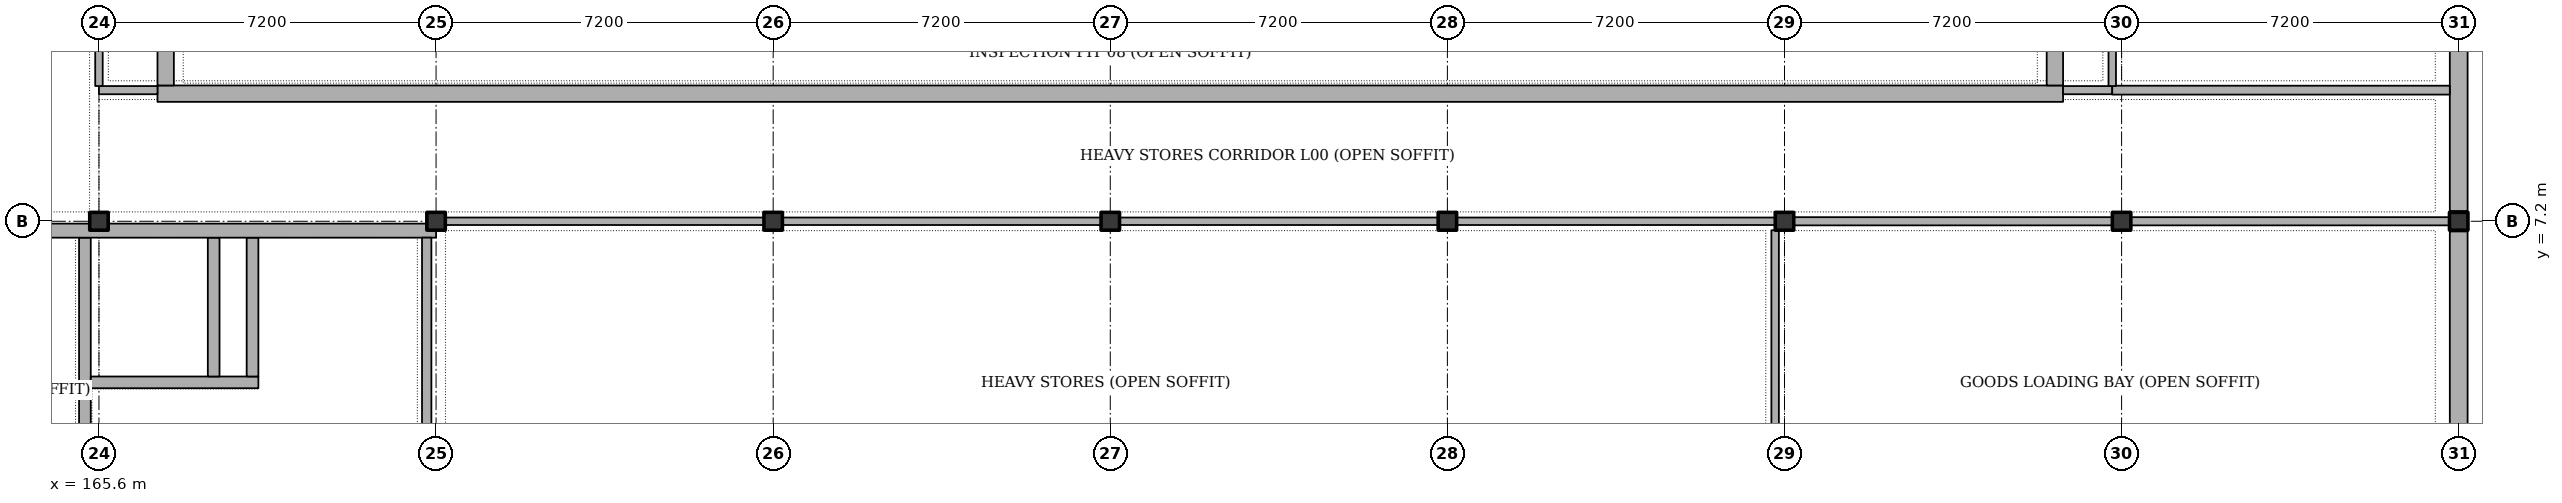
"""IFC4 building model, lengths in metres.
Left out: names, types, materials, properties, quantities, classifications, styles, units other than length and angle.
Written with IfcOpenShell. Run it as: python <this file> out.ifc"""

import sys

from ifc_helpers import new_model, si_unit, direction, frame, frame_2d, origin, origin_2d, place, context, subcontext, project, spatial, rectangle, i_section, extrude, element, fill, save


model = new_model("IFC4")
c1 = context("Model", 3, precision=1e-05, world=origin(), true_north=direction((0.0, 1.0)))
c2 = subcontext(c1, "Body", "Model", "MODEL_VIEW")
j1 = project(units=[si_unit("LENGTHUNIT", "METRE"), si_unit("PLANEANGLEUNIT", "RADIAN")], contexts=[c1])
p1 = place(None, origin())
s1 = spatial("IfcSite", under=j1, at=p1, CompositionType="ELEMENT")
p2 = place(p1, origin())
s2 = spatial("IfcBuilding", under=s1, at=p2, CompositionType="ELEMENT")
p3 = place(p2, origin())
s3 = spatial("IfcBuildingStorey", under=s2, at=p3, CompositionType="ELEMENT", Elevation=0.0)
p4 = place(p3, frame((166.85, 9.925, -1.55), z_axis=(0.0, 0.0, 1.0), x_axis=(1.0, 0.0, 0.0)))
e1 = element("IfcWall", 1, at=p4, inside=s3, PredefinedType="USERDEFINED", context=c2, shape_type="SweptSolid", body=[
    extrude(rectangle(XDim=40.7, YDim=0.35, at=frame_2d((20.35, 0.0))), origin(), (0.0, 0.0, 1.0), 1.55),
])
for number, where, z_axis, x_axis in (
    (2, (167.025, 10.1, -1.55), (0.0, 0.0, 1.0), (0.0, 1.0, 0.0)),
    (3, (207.375, 10.1, -1.55), (0.0, 0.0, 1.0), (0.0, 1.0, 0.0)),
):
    element("IfcWall", number, at=place(p3, frame(where, z_axis=z_axis, x_axis=x_axis)), inside=s3, PredefinedType="USERDEFINED", context=c2, shape_type="SweptSolid", body=[
        extrude(rectangle(XDim=1.4, YDim=0.35, at=frame_2d((0.7, 0.0))), origin(), (0.0, 0.0, 1.0), 1.55),
    ])
for number, where, z_axis, x_axis in (
    (4, (165.6, 7.2, -0.3), (0.0, 0.0, 1.0), (1.0, 0.0, 0.0)),
    (5, (172.8, 7.2, -0.3), (0.0, 0.0, 1.0), (1.0, 0.0, 0.0)),
    (6, (180.0, 7.2, -0.3), (0.0, 0.0, 1.0), (1.0, 0.0, 0.0)),
    (7, (187.2, 7.2, -0.3), (0.0, 0.0, 1.0), (1.0, 0.0, 0.0)),
    (8, (194.4, 7.2, -0.3), (0.0, 0.0, 1.0), (1.0, 0.0, 0.0)),
    (9, (201.6, 7.2, -0.3), (0.0, 0.0, 1.0), (1.0, 0.0, 0.0)),
    (10, (208.8, 7.2, -0.3), (0.0, 0.0, 1.0), (1.0, 0.0, 0.0)),
    (11, (216.0, 7.2, -0.3), (0.0, 0.0, 1.0), (1.0, 0.0, 0.0)),
):
    element("IfcColumn", number, at=place(p3, frame(where, z_axis=z_axis, x_axis=x_axis)), inside=s3, PredefinedType="COLUMN", context=c2, shape_type="SweptSolid", body=[
        extrude(i_section(OverallWidth=0.395, OverallDepth=0.381, WebThickness=0.018, FlangeThickness=0.03, FilletRadius=0.015, at=origin_2d()), origin(), (0.0, 0.0, 1.0), 5.7),
    ])
p5 = place(p3, frame((216.0, 14.183, 0.0), z_axis=(0.0, 0.0, 1.0), x_axis=(0.0, -1.0, 0.0)))
e12 = element("IfcWall", 12, at=p5, inside=s3, PredefinedType="SOLIDWALL", context=c2, shape_type="SweptSolid", body=[
    extrude(rectangle(XDim=6.765, YDim=0.38, at=frame_2d((3.383, 0.0))), origin(), (0.0, 0.0, 1.0), 4.413),
])
p6 = place(p5, frame((1.066, 0.0, 1.05)))
e13 = element("IfcOpeningElement", 13, at=p6, cuts=e12, PredefinedType="OPENING", context=c2, shape_type="SweptSolid", body=[
    extrude(rectangle(XDim=2.2, YDim=1.35, at=frame_2d((1.1, 0.675))), frame((0.0, 0.2, 0.0), z_axis=(0.0, -1.0, 0.0), x_axis=(1.0, 0.0, 0.0)), (0.0, 0.0, 1.0), 0.4),
])
p7 = place(p3, frame((216.0, 6.983, 0.0), z_axis=(0.0, 0.0, 1.0), x_axis=(0.0, -1.0, 0.0)))
e14 = element("IfcWall", 14, at=p7, inside=s3, PredefinedType="SOLIDWALL", context=c2, shape_type="SweptSolid", body=[
    extrude(rectangle(XDim=6.765, YDim=0.38, at=frame_2d((3.383, 0.0))), origin(), (0.0, 0.0, 1.0), 4.413),
])
p8 = place(p7, frame((2.058, 0.0, 1.05)))
e15 = element("IfcOpeningElement", 15, at=p8, cuts=e14, PredefinedType="OPENING", context=c2, shape_type="SweptSolid", body=[
    extrude(rectangle(XDim=2.65, YDim=1.6, at=frame_2d((1.325, 0.8))), frame((0.0, 0.2, 0.0), z_axis=(0.0, -1.0, 0.0), x_axis=(1.0, 0.0, 0.0)), (0.0, 0.0, 1.0), 0.4),
])
p9 = place(p3, frame((165.3, 0.18, 0.0), z_axis=(0.0, 0.0, 1.0), x_axis=(0.0, 1.0, 0.0)))
e16 = element("IfcWall", 16, at=p9, inside=s3, PredefinedType="SHEAR", context=c2, shape_type="SweptSolid", body=[
    extrude(rectangle(XDim=6.67, YDim=0.25, at=frame_2d((3.335, 0.0))), origin(), (0.0, 0.0, 1.0), 4.45),
])
p10 = place(p9, frame((1.12, 0.0, 0.0)))
e17 = element("IfcOpeningElement", 17, at=p10, cuts=e16, PredefinedType="OPENING", context=c2, shape_type="SweptSolid", body=[
    extrude(rectangle(XDim=1.35, YDim=2.15, at=frame_2d((0.675, 1.075))), frame((0.0, 0.135, 0.0), z_axis=(0.0, -1.0, 0.0), x_axis=(1.0, 0.0, 0.0)), (0.0, 0.0, 1.0), 0.27),
])
p11 = place(p3, frame((165.425, 3.76, 0.0), z_axis=(0.0, 0.0, 1.0), x_axis=(1.0, 0.0, 0.0)))
e18 = element("IfcWall", 18, at=p11, inside=s3, PredefinedType="SHEAR", context=c2, shape_type="SweptSolid", body=[
    extrude(rectangle(XDim=3.58, YDim=0.25, at=frame_2d((1.79, 0.0))), origin(), (0.0, 0.0, 1.0), 4.45),
])
p12 = place(p11, frame((0.775, 0.0, 0.0)))
e19 = element("IfcOpeningElement", 19, at=p12, cuts=e18, PredefinedType="OPENING", context=c2, shape_type="SweptSolid", body=[
    extrude(rectangle(XDim=1.3, YDim=2.2, at=frame_2d((0.65, 1.1))), frame((0.0, 0.135, 0.0), z_axis=(0.0, -1.0, 0.0), x_axis=(1.0, 0.0, 0.0)), (0.0, 0.0, 1.0), 0.27),
])
p13 = place(p3, frame((168.05, 3.885, 0.0), z_axis=(0.0, 0.0, 1.0), x_axis=(0.0, 1.0, 0.0)))
e20 = element("IfcWall", 20, at=p13, inside=s3, PredefinedType="SHEAR", context=c2, shape_type="SweptSolid", body=[
    extrude(rectangle(XDim=2.965, YDim=0.25, at=frame_2d((1.482, 0.0))), origin(), (0.0, 0.0, 1.0), 4.45),
])
p14 = place(p3, frame((168.88, 3.885, 0.0), z_axis=(0.0, 0.0, 1.0), x_axis=(0.0, 1.0, 0.0)))
e21 = element("IfcWall", 21, at=p14, inside=s3, PredefinedType="SHEAR", context=c2, shape_type="SweptSolid", body=[
    extrude(rectangle(XDim=2.965, YDim=0.25, at=frame_2d((1.482, 0.0))), origin(), (0.0, 0.0, 1.0), 4.45),
])
p15 = place(p14, frame((0.9, 0.0, 0.0)))
e22 = element("IfcOpeningElement", 22, at=p15, cuts=e21, PredefinedType="OPENING", context=c2, shape_type="SweptSolid", body=[
    extrude(rectangle(XDim=0.92, YDim=2.05, at=frame_2d((0.46, 1.025))), frame((0.0, 0.135, 0.0), z_axis=(0.0, -1.0, 0.0), x_axis=(1.0, 0.0, 0.0)), (0.0, 0.0, 1.0), 0.27),
])
p16 = place(p3, frame((158.57, 7.0, 0.0), z_axis=(0.0, 0.0, 1.0), x_axis=(1.0, 0.0, 0.0)))
e23 = element("IfcWall", 23, at=p16, inside=s3, PredefinedType="SHEAR", context=c2, shape_type="SweptSolid", body=[
    extrude(rectangle(XDim=14.23, YDim=0.3, at=frame_2d((7.115, 0.0))), origin(), (0.0, 0.0, 1.0), 4.45),
])
p17 = place(p16, frame((11.38, 0.0, 0.0)))
e24 = element("IfcOpeningElement", 24, at=p17, cuts=e23, PredefinedType="OPENING", context=c2, shape_type="SweptSolid", body=[
    extrude(rectangle(XDim=1.5, YDim=2.15, at=frame_2d((0.75, 1.075))), frame((0.0, 0.16, 0.0), z_axis=(0.0, -1.0, 0.0), x_axis=(1.0, 0.0, 0.0)), (0.0, 0.0, 1.0), 0.32),
])
p18 = place(p3, frame((172.6, 0.18, 0.0), z_axis=(0.0, 0.0, 1.0), x_axis=(0.0, 1.0, 0.0)))
e25 = element("IfcWall", 25, at=p18, inside=s3, PredefinedType="SOLIDWALL", context=c2, shape_type="SweptSolid", body=[
    extrude(rectangle(XDim=6.67, YDim=0.2, at=frame_2d((3.335, 0.0))), origin(), (0.0, 0.0, 1.0), 4.245),
])
p19 = place(p3, frame((165.6, 10.0, 0.0), z_axis=(0.0, 0.0, 1.0), x_axis=(1.0, 0.0, 0.0)))
e26 = element("IfcWall", 26, at=p19, inside=s3, PredefinedType="PARTITIONING", context=c2, shape_type="SweptSolid", body=[
    extrude(rectangle(XDim=1.25, YDim=0.175, at=frame_2d((0.625, 0.0))), origin(), (0.0, 0.0, 1.0), 3.55),
])
p20 = place(p19, frame((0.25, 0.0, 0.0)))
e27 = element("IfcOpeningElement", 27, at=p20, cuts=e26, PredefinedType="OPENING", context=c2, shape_type="SweptSolid", body=[
    extrude(rectangle(XDim=0.88, YDim=2.05, at=frame_2d((0.44, 1.025))), frame((0.0, 0.097, 0.0), z_axis=(0.0, -1.0, 0.0), x_axis=(1.0, 0.0, 0.0)), (0.0, 0.0, 1.0), 0.195),
])
p21 = place(p3, frame((207.55, 10.0, 0.0), z_axis=(0.0, 0.0, 1.0), x_axis=(1.0, 0.0, 0.0)))
e28 = element("IfcWall", 28, at=p21, inside=s3, PredefinedType="PARTITIONING", context=c2, shape_type="SweptSolid", body=[
    extrude(rectangle(XDim=1.05, YDim=0.175, at=frame_2d((0.525, 0.0))), origin(), (0.0, 0.0, 1.0), 3.55),
])
p22 = place(p3, frame((208.6, 10.0, 0.0), z_axis=(0.0, 0.0, 1.0), x_axis=(1.0, 0.0, 0.0)))
e29 = element("IfcWall", 29, at=p22, inside=s3, PredefinedType="PARTITIONING", context=c2, shape_type="SweptSolid", body=[
    extrude(rectangle(XDim=7.21, YDim=0.19, at=frame_2d((3.605, 0.0))), origin(), (0.0, 0.0, 1.0), 3.55),
])
p23 = place(p22, frame((2.675, 0.0, 0.0)))
e30 = element("IfcOpeningElement", 30, at=p23, cuts=e29, PredefinedType="OPENING", context=c2, shape_type="SweptSolid", body=[
    extrude(rectangle(XDim=1.75, YDim=2.25, at=frame_2d((0.875, 1.125))), frame((0.0, 0.105, 0.0), z_axis=(0.0, -1.0, 0.0), x_axis=(1.0, 0.0, 0.0)), (0.0, 0.0, 1.0), 0.21),
])
p24 = place(p3, frame((172.999, 7.2, 0.0), z_axis=(0.0, 0.0, 1.0), x_axis=(1.0, 0.0, 0.0)))
e31 = element("IfcWall", 31, at=p24, inside=s3, PredefinedType="PARTITIONING", context=c2, shape_type="SweptSolid", body=[
    extrude(rectangle(XDim=6.802, YDim=0.16, at=frame_2d((3.401, 0.0))), origin(), (0.0, 0.0, 1.0), 3.55),
])
p25 = place(p3, frame((180.199, 7.2, 0.0), z_axis=(0.0, 0.0, 1.0), x_axis=(1.0, 0.0, 0.0)))
e32 = element("IfcWall", 32, at=p25, inside=s3, PredefinedType="PARTITIONING", context=c2, shape_type="SweptSolid", body=[
    extrude(rectangle(XDim=6.802, YDim=0.16, at=frame_2d((3.401, 0.0))), origin(), (0.0, 0.0, 1.0), 3.55),
])
p26 = place(p25, frame((2.861, 0.0, 0.0)))
e33 = element("IfcOpeningElement", 33, at=p26, cuts=e32, PredefinedType="OPENING", context=c2, shape_type="SweptSolid", body=[
    extrude(rectangle(XDim=1.08, YDim=2.15, at=frame_2d((0.54, 1.075))), frame((0.0, 0.09, 0.0), z_axis=(0.0, -1.0, 0.0), x_axis=(1.0, 0.0, 0.0)), (0.0, 0.0, 1.0), 0.18),
])
p27 = place(p3, frame((187.399, 7.2, 0.0), z_axis=(0.0, 0.0, 1.0), x_axis=(1.0, 0.0, 0.0)))
e34 = element("IfcWall", 34, at=p27, inside=s3, PredefinedType="PARTITIONING", context=c2, shape_type="SweptSolid", body=[
    extrude(rectangle(XDim=6.802, YDim=0.16, at=frame_2d((3.401, 0.0))), origin(), (0.0, 0.0, 1.0), 3.55),
])
p28 = place(p3, frame((194.599, 7.2, 0.0), z_axis=(0.0, 0.0, 1.0), x_axis=(1.0, 0.0, 0.0)))
e35 = element("IfcWall", 35, at=p28, inside=s3, PredefinedType="PARTITIONING", context=c2, shape_type="SweptSolid", body=[
    extrude(rectangle(XDim=6.801, YDim=0.16, at=frame_2d((3.4, 0.0))), origin(), (0.0, 0.0, 1.0), 3.55),
])
p29 = place(p3, frame((201.799, 7.2, 0.0), z_axis=(0.0, 0.0, 1.0), x_axis=(1.0, 0.0, 0.0)))
e36 = element("IfcWall", 36, at=p29, inside=s3, PredefinedType="PARTITIONING", context=c2, shape_type="SweptSolid", body=[
    extrude(rectangle(XDim=6.802, YDim=0.175, at=frame_2d((3.401, 0.0))), origin(), (0.0, 0.0, 1.0), 3.55),
])
p30 = place(p29, frame((2.841, 0.0, 0.0)))
e37 = element("IfcOpeningElement", 37, at=p30, cuts=e36, PredefinedType="OPENING", context=c2, shape_type="SweptSolid", body=[
    extrude(rectangle(XDim=1.12, YDim=2.18, at=frame_2d((0.56, 1.09))), frame((0.0, 0.097, 0.0), z_axis=(0.0, -1.0, 0.0), x_axis=(1.0, 0.0, 0.0)), (0.0, 0.0, 1.0), 0.195),
])
p31 = place(p3, frame((208.999, 7.2, 0.0), z_axis=(0.0, 0.0, 1.0), x_axis=(1.0, 0.0, 0.0)))
e38 = element("IfcWall", 38, at=p31, inside=s3, PredefinedType="PARTITIONING", context=c2, shape_type="SweptSolid", body=[
    extrude(rectangle(XDim=6.802, YDim=0.175, at=frame_2d((3.401, 0.0))), origin(), (0.0, 0.0, 1.0), 3.55),
])
for number, where, z_axis, x_axis in (
    (39, (165.6, 10.088, 0.0), (0.0, 0.0, 1.0), (0.0, 1.0, 0.0)),
    (40, (208.6, 10.088, 0.0), (0.0, 0.0, 1.0), (0.0, 1.0, 0.0)),
):
    element("IfcWall", number, at=place(p3, frame(where, z_axis=z_axis, x_axis=x_axis)), inside=s3, PredefinedType="PARTITIONING", context=c2, shape_type="SweptSolid", body=[
        extrude(rectangle(XDim=4.119, YDim=0.16, at=frame_2d((2.06, 0.0))), origin(), (0.0, 0.0, 1.0), 3.55),
    ])
p32 = place(p3, frame((201.4, 0.193, 0.0), z_axis=(0.0, 0.0, 1.0), x_axis=(0.0, 1.0, 0.0)))
e41 = element("IfcWall", 41, at=p32, inside=s3, PredefinedType="PARTITIONING", context=c2, shape_type="SweptSolid", body=[
    extrude(rectangle(XDim=6.815, YDim=0.16, at=frame_2d((3.407, 0.0))), origin(), (0.0, 0.0, 1.0), 3.55),
])
p33 = place(p8, origin())
e42 = element("IfcWindow", 42, at=p33, inside=s3, PartitioningType="SINGLE_PANEL", PredefinedType="WINDOW", context=c2, shape_type="SweptSolid", body=[
    extrude(rectangle(XDim=2.65, YDim=1.6, at=frame_2d((1.325, 0.8))), frame((0.0, 0.03, 0.0), z_axis=(0.0, -1.0, 0.0), x_axis=(1.0, 0.0, 0.0)), (0.0, 0.0, 1.0), 0.06),
])
fill(e15, e42)
p34 = place(p12, origin())
e43 = element("IfcDoor", 43, at=p34, inside=s3, OperationType="SLIDING_TO_LEFT", PredefinedType="DOOR", context=c2, shape_type="SweptSolid", body=[
    extrude(rectangle(XDim=1.3, YDim=2.2, at=frame_2d((0.65, 1.1))), frame((0.0, 0.025, 0.0), z_axis=(0.0, -1.0, 0.0), x_axis=(1.0, 0.0, 0.0)), (0.0, 0.0, 1.0), 0.05),
])
fill(e19, e43)
p35 = place(p15, origin())
e44 = element("IfcDoor", 44, at=p35, inside=s3, OperationType="SINGLE_SWING_RIGHT", PredefinedType="DOOR", context=c2, shape_type="SweptSolid", body=[
    extrude(rectangle(XDim=0.92, YDim=2.05, at=frame_2d((0.46, 1.025))), frame((0.0, 0.025, 0.0), z_axis=(0.0, -1.0, 0.0), x_axis=(1.0, 0.0, 0.0)), (0.0, 0.0, 1.0), 0.05),
])
fill(e22, e44)
p36 = place(p17, origin())
e45 = element("IfcDoor", 45, at=p36, inside=s3, OperationType="SINGLE_SWING_LEFT", PredefinedType="DOOR", context=c2, shape_type="SweptSolid", body=[
    extrude(rectangle(XDim=1.5, YDim=2.15, at=frame_2d((0.75, 1.075))), frame((0.0, 0.025, 0.0), z_axis=(0.0, -1.0, 0.0), x_axis=(1.0, 0.0, 0.0)), (0.0, 0.0, 1.0), 0.05),
])
fill(e24, e45)
p37 = place(p20, origin())
e46 = element("IfcDoor", 46, at=p37, inside=s3, OperationType="SINGLE_SWING_RIGHT", PredefinedType="DOOR", context=c2, shape_type="SweptSolid", body=[
    extrude(rectangle(XDim=0.88, YDim=2.05, at=frame_2d((0.44, 1.025))), frame((0.0, 0.025, 0.0), z_axis=(0.0, -1.0, 0.0), x_axis=(1.0, 0.0, 0.0)), (0.0, 0.0, 1.0), 0.05),
])
fill(e27, e46)
p38 = place(p23, origin())
e47 = element("IfcDoor", 47, at=p38, inside=s3, OperationType="DOUBLE_SWING_LEFT", PredefinedType="DOOR", context=c2, shape_type="SweptSolid", body=[
    extrude(rectangle(XDim=1.75, YDim=2.25, at=frame_2d((0.875, 1.125))), frame((0.0, 0.025, 0.0), z_axis=(0.0, -1.0, 0.0), x_axis=(1.0, 0.0, 0.0)), (0.0, 0.0, 1.0), 0.05),
])
fill(e30, e47)
p39 = place(p26, origin())
e48 = element("IfcDoor", 48, at=p39, inside=s3, OperationType="SINGLE_SWING_LEFT", PredefinedType="DOOR", context=c2, shape_type="SweptSolid", body=[
    extrude(rectangle(XDim=1.08, YDim=2.15, at=frame_2d((0.54, 1.075))), frame((0.0, 0.025, 0.0), z_axis=(0.0, -1.0, 0.0), x_axis=(1.0, 0.0, 0.0)), (0.0, 0.0, 1.0), 0.05),
])
fill(e33, e48)
p40 = place(p30, origin())
e49 = element("IfcDoor", 49, at=p40, inside=s3, OperationType="SINGLE_SWING_RIGHT", PredefinedType="DOOR", context=c2, shape_type="SweptSolid", body=[
    extrude(rectangle(XDim=1.12, YDim=2.18, at=frame_2d((0.56, 1.09))), frame((0.0, 0.025, 0.0), z_axis=(0.0, -1.0, 0.0), x_axis=(1.0, 0.0, 0.0)), (0.0, 0.0, 1.0), 0.05),
])
fill(e37, e49)
save(model, sys.argv[1])
